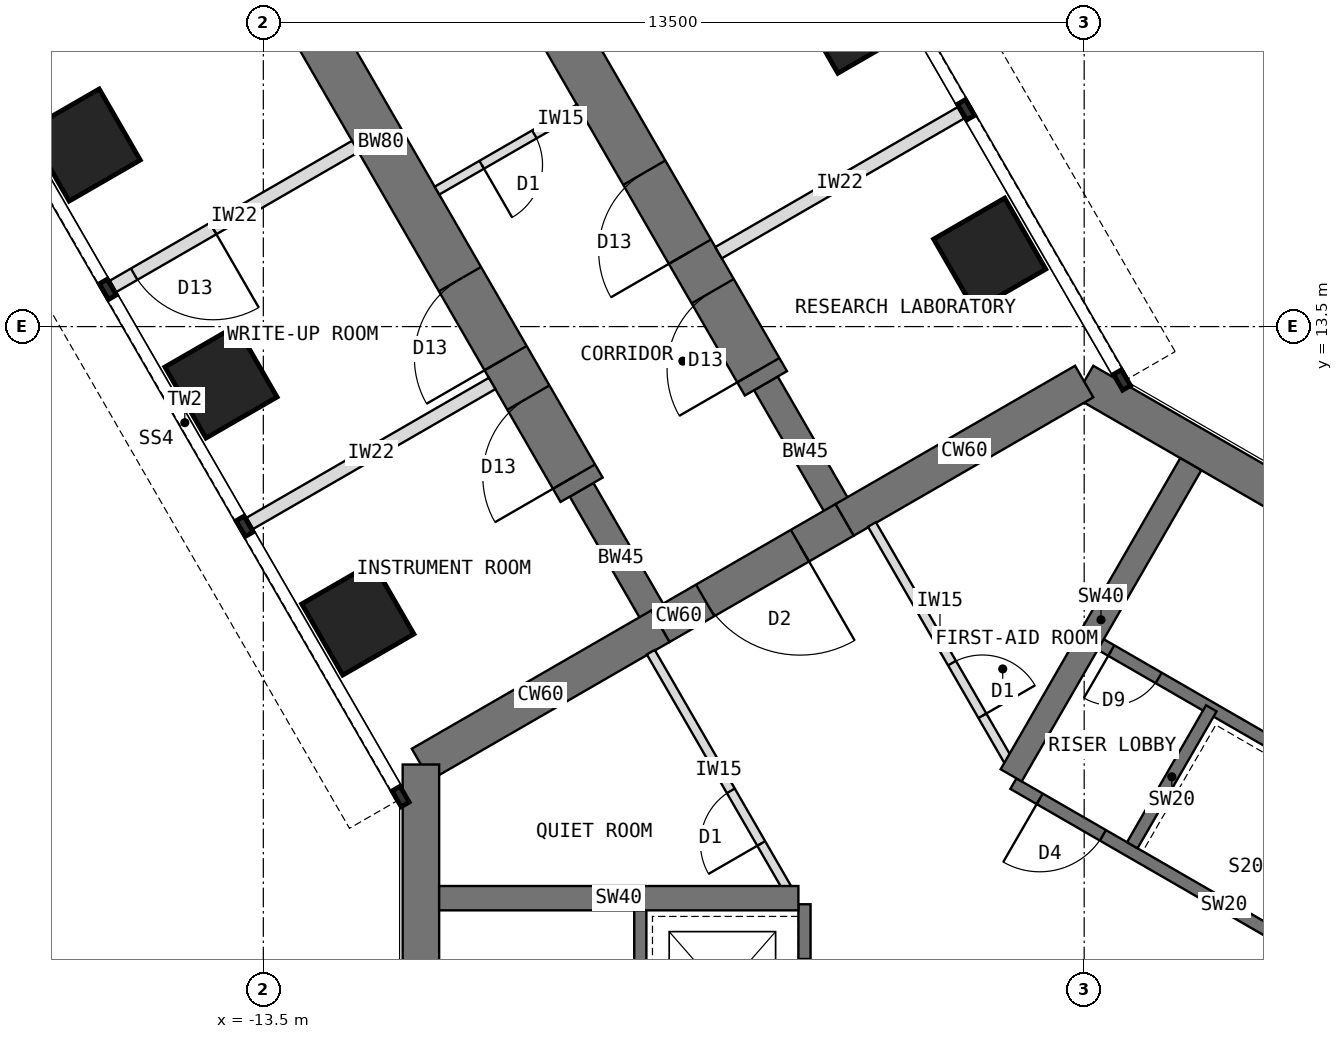
"""IFC4 building model, lengths in metres.
Left out: names, types, materials, properties, quantities, classifications, styles, units other than length and angle.
Written with IfcOpenShell. Run it as: python <this file> out.ifc"""

import sys

from ifc_helpers import new_model, si_unit, direction, frame, frame_2d, origin, origin_2d, place, context, subcontext, project, spatial, rectangle, extrude, element, fill, save


model = new_model("IFC4")
c1 = context("Model", 3, precision=1e-05, world=origin(), true_north=direction((0.0, 1.0)))
c2 = subcontext(c1, "Body", "Model", "MODEL_VIEW")
j1 = project(units=[si_unit("LENGTHUNIT", "METRE"), si_unit("PLANEANGLEUNIT", "RADIAN")], contexts=[c1])
p1 = place(None, origin())
s1 = spatial("IfcSite", under=j1, at=p1, CompositionType="ELEMENT")
p2 = place(p1, origin())
s2 = spatial("IfcBuilding", under=s1, at=p2, CompositionType="ELEMENT")
p3 = place(p2, frame((0.0, 0.0, 113.5)))
s3 = spatial("IfcBuildingStorey", under=s2, at=p3, CompositionType="ELEMENT", Elevation=113.5)
p4 = place(p3, frame((10.908, 6.298, 0.0), z_axis=(0.0, 0.0, 1.0), x_axis=(-0.866021940709, 0.500005998175, 0.0)))
e1 = element("IfcWall", 1, at=p4, inside=s3, PredefinedType="SHEAR", context=c2, shape_type="SweptSolid", body=[
    extrude(rectangle(XDim=12.596, YDim=0.6, at=frame_2d((6.298, 0.0))), origin(), (0.0, 0.0, 1.0), 4.0),
])
p5 = place(p3, frame((0.0, 12.596, 0.0), z_axis=(0.0, 0.0, 1.0), x_axis=(-0.866011268655, -0.500024481964, 0.0)))
e2 = element("IfcWall", 2, at=p5, inside=s3, PredefinedType="SHEAR", context=c2, shape_type="SweptSolid", body=[
    extrude(rectangle(XDim=4.548, YDim=0.6, at=frame_2d((2.274, 0.0))), origin(), (0.0, 0.0, 1.0), 4.0),
])
p6 = place(p3, frame((-3.939, 10.322, 0.0), z_axis=(0.0, 0.0, 1.0), x_axis=(-0.866019471182, -0.500010275428, 0.0)))
e3 = element("IfcWall", 3, at=p6, inside=s3, PredefinedType="SHEAR", context=c2, shape_type="SweptSolid", body=[
    extrude(rectangle(XDim=3.5, YDim=0.6, at=frame_2d((1.75, 0.0))), origin(), (0.0, 0.0, 1.0), 4.0),
])
p7 = place(p6, frame((0.85, 0.0, 0.0)))
e4 = element("IfcOpeningElement", 4, at=p7, cuts=e3, PredefinedType="OPENING", context=c2, shape_type="SweptSolid", body=[
    extrude(rectangle(XDim=1.8, YDim=2.1, at=frame_2d((0.9, 1.05))), frame((0.0, 0.31, 0.0), z_axis=(0.0, -1.0, 0.0), x_axis=(1.0, 0.0, 0.0)), (0.0, 0.0, 1.0), 0.62),
])
p8 = place(p3, frame((-6.97, 8.572, 0.0), z_axis=(0.0, 0.0, 1.0), x_axis=(-0.866034513004, -0.499984222037, 0.0)))
e5 = element("IfcWall", 5, at=p8, inside=s3, PredefinedType="SHEAR", context=c2, shape_type="SweptSolid", body=[
    extrude(rectangle(XDim=4.548, YDim=0.6, at=frame_2d((2.274, 0.0))), origin(), (0.0, 0.0, 1.0), 4.0),
])
p9 = place(p3, frame((-10.908, 6.298, 0.0), z_axis=(0.0, 0.0, 1.0), x_axis=(0.0, -1.0, 0.0)))
e6 = element("IfcWall", 6, at=p9, inside=s3, PredefinedType="SHEAR", context=c2, shape_type="SweptSolid", body=[
    extrude(rectangle(XDim=12.596, YDim=0.6, at=frame_2d((6.298, 0.0))), origin(), (0.0, 0.0, 1.0), 4.0),
])
p10 = place(p3, frame((-6.97, 8.572, 0.0), z_axis=(0.0, 0.0, 1.0), x_axis=(-0.499988811324, 0.866031863473, 0.0)))
e7 = element("IfcWall", 7, at=p10, inside=s3, PredefinedType="SHEAR", context=c2, shape_type="SweptSolid", body=[
    extrude(rectangle(XDim=2.592, YDim=0.45, at=frame_2d((1.296, 0.0))), origin(), (0.0, 0.0, 1.0), 4.0),
])
p11 = place(p3, frame((-8.266, 10.816, 0.0), z_axis=(0.0, 0.0, 1.0), x_axis=(-0.499996231654, 0.866027579429, 0.0)))
e8 = element("IfcWall", 8, at=p11, inside=s3, PredefinedType="SHEAR", context=c2, shape_type="SweptSolid", body=[
    extrude(rectangle(XDim=13.2, YDim=0.8, at=frame_2d((6.6, 0.0))), origin(), (0.0, 0.0, 1.0), 4.0),
])
p12 = place(p11, frame((0.25, 0.0, 0.0)))
e9 = element("IfcOpeningElement", 9, at=p12, cuts=e8, PredefinedType="OPENING", context=c2, shape_type="SweptSolid", body=[
    extrude(rectangle(XDim=1.5, YDim=2.1, at=frame_2d((0.75, 1.05))), frame((0.0, 0.41, 0.0), z_axis=(0.0, -1.0, 0.0), x_axis=(1.0, 0.0, 0.0)), (0.0, 0.0, 1.0), 0.82),
])
p13 = place(p11, frame((2.5, 0.0, 0.0)))
e10 = element("IfcOpeningElement", 10, at=p13, cuts=e8, PredefinedType="OPENING", context=c2, shape_type="SweptSolid", body=[
    extrude(rectangle(XDim=1.5, YDim=2.1, at=frame_2d((0.75, 1.05))), frame((0.0, 0.41, 0.0), z_axis=(0.0, -1.0, 0.0), x_axis=(1.0, 0.0, 0.0)), (0.0, 0.0, 1.0), 0.82),
])
p14 = place(p3, frame((-3.939, 10.322, 0.0), z_axis=(0.0, 0.0, 1.0), x_axis=(-0.499918158782, 0.866072649678, 0.0)))
e11 = element("IfcWall", 11, at=p14, inside=s3, PredefinedType="SHEAR", context=c2, shape_type="SweptSolid", body=[
    extrude(rectangle(XDim=2.592, YDim=0.45, at=frame_2d((1.296, 0.0))), origin(), (0.0, 0.0, 1.0), 4.0),
])
p15 = place(p3, frame((-5.234, 12.566, 0.0), z_axis=(0.0, 0.0, 1.0), x_axis=(-0.500010103361, 0.866019570528, 0.0)))
e12 = element("IfcWall", 12, at=p15, inside=s3, PredefinedType="SHEAR", context=c2, shape_type="SweptSolid", body=[
    extrude(rectangle(XDim=13.2, YDim=0.8, at=frame_2d((6.6, 0.0))), origin(), (0.0, 0.0, 1.0), 4.0),
])
p16 = place(p15, frame((0.25, 0.0, 0.0)))
e13 = element("IfcOpeningElement", 13, at=p16, cuts=e12, PredefinedType="OPENING", context=c2, shape_type="SweptSolid", body=[
    extrude(rectangle(XDim=1.5, YDim=2.1, at=frame_2d((0.75, 1.05))), frame((0.0, 0.41, 0.0), z_axis=(0.0, -1.0, 0.0), x_axis=(1.0, 0.0, 0.0)), (0.0, 0.0, 1.0), 0.82),
])
p17 = place(p15, frame((2.5, 0.0, 0.0)))
e14 = element("IfcOpeningElement", 14, at=p17, cuts=e12, PredefinedType="OPENING", context=c2, shape_type="SweptSolid", body=[
    extrude(rectangle(XDim=1.5, YDim=2.1, at=frame_2d((0.75, 1.05))), frame((0.0, 0.41, 0.0), z_axis=(0.0, -1.0, 0.0), x_axis=(1.0, 0.0, 0.0)), (0.0, 0.0, 1.0), 0.82),
])
for number, where, z_axis, x_axis in (
    (15, (-11.946, 8.691, 0.0), (0.0, 0.0, 1.0), (0.866, 0.5, 0.0)),
    (16, (-1.554, 14.691, 0.0), (0.0, 0.0, 1.0), (0.866, 0.5, 0.0)),
    (17, (-14.196, 12.588, 0.0), (0.0, 0.0, 1.0), (0.866, 0.5, 0.0)),
    (18, (-3.804, 18.588, 0.0), (0.0, 0.0, 1.0), (0.866, 0.5, 0.0)),
    (19, (-16.446, 16.486, 0.0), (0.0, 0.0, 1.0), (0.866, 0.5, 0.0)),
):
    element("IfcColumn", number, at=place(p3, frame(where, z_axis=z_axis, x_axis=x_axis)), inside=s3, PredefinedType="COLUMN", context=c2, shape_type="SweptSolid", body=[
        extrude(rectangle(XDim=1.35, YDim=1.35, at=origin_2d()), origin(), (0.0, 0.0, 1.0), 4.0),
    ])
p18 = place(p3, frame((-18.456, 18.067, 0.0), z_axis=(0.0, 0.0, 1.0), x_axis=(0.865998469481, 0.500046648681, 0.0)))
e20 = element("IfcWall", 20, at=p18, inside=s3, PredefinedType="STANDARD", context=c2, shape_type="SweptSolid", body=[
    extrude(rectangle(XDim=2.325, YDim=0.25, at=frame_2d((1.163, 0.0))), origin(), (0.0, 0.0, 1.0), 3.8),
])
p19 = place(p3, frame((5.764, 1.984, 0.0), z_axis=(0.0, 0.0, 1.0), x_axis=(-0.866026010844, 0.49999894854, 0.0)))
e21 = element("IfcWall", 21, at=p19, inside=s3, PredefinedType="SHEAR", context=c2, shape_type="SweptSolid", body=[
    extrude(rectangle(XDim=8.0, YDim=0.2, at=frame_2d((4.0, 0.0))), origin(), (0.0, 0.0, 1.0), 4.0),
])
p20 = place(p19, frame((6.3, 0.0, 0.0)))
e22 = element("IfcOpeningElement", 22, at=p20, cuts=e21, PredefinedType="OPENING", context=c2, shape_type="SweptSolid", body=[
    extrude(rectangle(XDim=1.2, YDim=2.1, at=frame_2d((0.6, 1.05))), frame((0.0, 0.11, 0.0), z_axis=(0.0, -1.0, 0.0), x_axis=(1.0, 0.0, 0.0)), (0.0, 0.0, 1.0), 0.22),
])
p21 = place(p3, frame((0.791, 4.97, 0.0), z_axis=(0.0, 0.0, 1.0), x_axis=(0.499936506574, 0.866062058628, 0.0)))
e23 = element("IfcWall", 23, at=p21, inside=s3, PredefinedType="SHEAR", context=c2, shape_type="SweptSolid", body=[
    extrude(rectangle(XDim=2.6, YDim=0.2, at=frame_2d((1.3, 0.0))), origin(), (0.0, 0.0, 1.0), 4.0),
])
p22 = place(p3, frame((7.114, 4.322, 0.0), z_axis=(0.0, 0.0, 1.0), x_axis=(-0.866026010844, 0.49999894854, 0.0)))
e24 = element("IfcWall", 24, at=p22, inside=s3, PredefinedType="SHEAR", context=c2, shape_type="SweptSolid", body=[
    extrude(rectangle(XDim=8.0, YDim=0.2, at=frame_2d((4.0, 0.0))), origin(), (0.0, 0.0, 1.0), 4.0),
])
p23 = place(p22, frame((6.8, 0.0, 0.0)))
e25 = element("IfcOpeningElement", 25, at=p23, cuts=e24, PredefinedType="OPENING", context=c2, shape_type="SweptSolid", body=[
    extrude(rectangle(XDim=0.9, YDim=2.1, at=frame_2d((0.45, 1.05))), frame((0.0, 0.11, 0.0), z_axis=(0.0, -1.0, 0.0), x_axis=(1.0, 0.0, 0.0)), (0.0, 0.0, 1.0), 0.22),
])
p24 = place(p3, frame((-1.201, 6.12, 0.0), z_axis=(0.0, 0.0, 1.0), x_axis=(0.49999668571, 0.866027317282, 0.0)))
e26 = element("IfcWall", 26, at=p24, inside=s3, PredefinedType="SHEAR", context=c2, shape_type="SweptSolid", body=[
    extrude(rectangle(XDim=5.908, YDim=0.4, at=frame_2d((2.954, 0.0))), origin(), (0.0, 0.0, 1.0), 4.0),
])
p25 = place(p3, frame((-4.6, 4.0, 0.0), z_axis=(0.0, 0.0, 1.0), x_axis=(0.0, -1.0, 0.0)))
e27 = element("IfcWall", 27, at=p25, inside=s3, PredefinedType="SHEAR", context=c2, shape_type="SweptSolid", body=[
    extrude(rectangle(XDim=8.0, YDim=0.2, at=frame_2d((4.0, 0.0))), origin(), (0.0, 0.0, 1.0), 4.0),
])
p26 = place(p25, frame((6.3, 0.0, 0.0)))
e28 = element("IfcOpeningElement", 28, at=p26, cuts=e27, PredefinedType="OPENING", context=c2, shape_type="SweptSolid", body=[
    extrude(rectangle(XDim=1.2, YDim=2.1, at=frame_2d((0.6, 1.05))), frame((0.0, 0.11, 0.0), z_axis=(0.0, -1.0, 0.0), x_axis=(1.0, 0.0, 0.0)), (0.0, 0.0, 1.0), 0.22),
])
p27 = place(p25, frame((0.9, 0.0, 0.0)))
e29 = element("IfcOpeningElement", 29, at=p27, cuts=e27, PredefinedType="OPENING", context=c2, shape_type="SweptSolid", body=[
    extrude(rectangle(XDim=1.1, YDim=2.2, at=frame_2d((0.55, 1.1))), frame((0.0, 0.11, 0.0), z_axis=(0.0, -1.0, 0.0), x_axis=(1.0, 0.0, 0.0)), (0.0, 0.0, 1.0), 0.22),
])
p28 = place(p3, frame((-7.3, 4.0, 0.0), z_axis=(0.0, 0.0, 1.0), x_axis=(0.0, -1.0, 0.0)))
e30 = element("IfcWall", 30, at=p28, inside=s3, PredefinedType="SHEAR", context=c2, shape_type="SweptSolid", body=[
    extrude(rectangle(XDim=8.0, YDim=0.2, at=frame_2d((4.0, 0.0))), origin(), (0.0, 0.0, 1.0), 4.0),
])
p29 = place(p28, frame((6.7, 0.0, 0.0)))
e31 = element("IfcOpeningElement", 31, at=p29, cuts=e30, PredefinedType="OPENING", context=c2, shape_type="SweptSolid", body=[
    extrude(rectangle(XDim=1.1, YDim=2.1, at=frame_2d((0.55, 1.05))), frame((0.0, 0.11, 0.0), z_axis=(0.0, -1.0, 0.0), x_axis=(1.0, 0.0, 0.0)), (0.0, 0.0, 1.0), 0.22),
])
p30 = place(p3, frame((-4.7, 4.1, 0.0), z_axis=(0.0, 0.0, 1.0), x_axis=(-1.0, 0.0, 0.0)))
e32 = element("IfcWall", 32, at=p30, inside=s3, PredefinedType="SHEAR", context=c2, shape_type="SweptSolid", body=[
    extrude(rectangle(XDim=5.908, YDim=0.4, at=frame_2d((2.954, 0.0))), origin(), (0.0, 0.0, 1.0), 4.0),
])
p31 = place(p3, frame((-9.737, 12.565, 0.0), z_axis=(0.0, 0.0, 1.0), x_axis=(-0.866016770315, -0.500014953309, 0.0)))
e33 = element("IfcWall", 33, at=p31, inside=s3, PredefinedType="PARTITIONING", context=c2, shape_type="SweptSolid", body=[
    extrude(rectangle(XDim=4.6, YDim=0.215, at=frame_2d((2.3, 0.0))), origin(), (0.0, 0.0, 1.0), 3.8),
])
p32 = place(p3, frame((-11.987, 16.462, 0.0), z_axis=(0.0, 0.0, 1.0), x_axis=(-0.866039752405, -0.499975146636, 0.0)))
e34 = element("IfcWall", 34, at=p32, inside=s3, PredefinedType="PARTITIONING", context=c2, shape_type="SweptSolid", body=[
    extrude(rectangle(XDim=4.6, YDim=0.215, at=frame_2d((2.3, 0.0))), origin(), (0.0, 0.0, 1.0), 3.8),
])
p33 = place(p32, frame((2.7, 0.0, 0.0)))
e35 = element("IfcOpeningElement", 35, at=p33, cuts=e34, PredefinedType="OPENING", context=c2, shape_type="SweptSolid", body=[
    extrude(rectangle(XDim=1.5, YDim=2.1, at=frame_2d((0.75, 1.05))), frame((0.0, 0.117, 0.0), z_axis=(0.0, -1.0, 0.0), x_axis=(1.0, 0.0, 0.0)), (0.0, 0.0, 1.0), 0.235),
])
p34 = place(p3, frame((-6.013, 14.715, 0.0), z_axis=(0.0, 0.0, 1.0), x_axis=(0.866016770315, 0.500014953309, 0.0)))
e36 = element("IfcWall", 36, at=p34, inside=s3, PredefinedType="PARTITIONING", context=c2, shape_type="SweptSolid", body=[
    extrude(rectangle(XDim=4.6, YDim=0.215, at=frame_2d((2.3, 0.0))), origin(), (0.0, 0.0, 1.0), 3.8),
])
p35 = place(p3, frame((-4.89, 4.27, 0.0), z_axis=(0.0, 0.0, 1.0), x_axis=(-0.499999473313, 0.866025707867, 0.0)))
e37 = element("IfcWall", 37, at=p35, inside=s3, PredefinedType="PARTITIONING", context=c2, shape_type="SweptSolid", body=[
    extrude(rectangle(XDim=4.476, YDim=0.15, at=frame_2d((2.238, 0.0))), origin(), (0.0, 0.0, 1.0), 3.8),
])
p36 = place(p35, frame((0.843, 0.0, 0.0)))
e38 = element("IfcOpeningElement", 38, at=p36, cuts=e37, PredefinedType="OPENING", context=c2, shape_type="SweptSolid", body=[
    extrude(rectangle(XDim=1.0, YDim=2.1, at=frame_2d((0.5, 1.05))), frame((0.0, 0.085, 0.0), z_axis=(0.0, -1.0, 0.0), x_axis=(1.0, 0.0, 0.0)), (0.0, 0.0, 1.0), 0.17),
])
p37 = place(p3, frame((-3.49, 10.246, 0.0), z_axis=(0.0, 0.0, 1.0), x_axis=(0.499999473313, -0.866025707867, 0.0)))
e39 = element("IfcWall", 39, at=p37, inside=s3, PredefinedType="PARTITIONING", context=c2, shape_type="SweptSolid", body=[
    extrude(rectangle(XDim=4.476, YDim=0.15, at=frame_2d((2.238, 0.0))), origin(), (0.0, 0.0, 1.0), 3.8),
])
p38 = place(p37, frame((2.633, 0.0, 0.0)))
e40 = element("IfcOpeningElement", 40, at=p38, cuts=e39, PredefinedType="OPENING", context=c2, shape_type="SweptSolid", body=[
    extrude(rectangle(XDim=1.0, YDim=2.1, at=frame_2d((0.5, 1.05))), frame((0.0, 0.085, 0.0), z_axis=(0.0, -1.0, 0.0), x_axis=(1.0, 0.0, 0.0)), (0.0, 0.0, 1.0), 0.17),
])
p39 = place(p3, frame((-8.306, 17.086, 0.0), z_axis=(0.0, 0.0, 1.0), x_axis=(-0.86599734893, -0.500048589285, 0.0)))
e41 = element("IfcWall", 41, at=p39, inside=s3, PredefinedType="PARTITIONING", context=c2, shape_type="SweptSolid", body=[
    extrude(rectangle(XDim=2.7, YDim=0.15, at=frame_2d((1.35, 0.0))), origin(), (0.0, 0.0, 1.0), 3.8),
])
p40 = place(p39, frame((0.85, 0.0, 0.0)))
e42 = element("IfcOpeningElement", 42, at=p40, cuts=e41, PredefinedType="OPENING", context=c2, shape_type="SweptSolid", body=[
    extrude(rectangle(XDim=1.0, YDim=2.1, at=frame_2d((0.5, 1.05))), frame((0.0, 0.085, 0.0), z_axis=(0.0, -1.0, 0.0), x_axis=(1.0, 0.0, 0.0)), (0.0, 0.0, 1.0), 0.17),
])
p41 = place(p20, origin())
e43 = element("IfcDoor", 43, at=p41, inside=s3, OperationType="SINGLE_SWING_RIGHT", PredefinedType="DOOR", context=c2, shape_type="SweptSolid", body=[
    extrude(rectangle(XDim=1.2, YDim=2.1, at=frame_2d((0.6, 1.05))), frame((0.0, 0.025, 0.0), z_axis=(0.0, -1.0, 0.0), x_axis=(1.0, 0.0, 0.0)), (0.0, 0.0, 1.0), 0.05),
])
fill(e22, e43)
p42 = place(p23, origin())
e44 = element("IfcDoor", 44, at=p42, inside=s3, OperationType="SINGLE_SWING_RIGHT", PredefinedType="DOOR", context=c2, shape_type="SweptSolid", body=[
    extrude(rectangle(XDim=0.9, YDim=2.1, at=frame_2d((0.45, 1.05))), frame((0.0, 0.025, 0.0), z_axis=(0.0, -1.0, 0.0), x_axis=(1.0, 0.0, 0.0)), (0.0, 0.0, 1.0), 0.05),
])
fill(e25, e44)
p43 = place(p7, origin())
e45 = element("IfcDoor", 45, at=p43, inside=s3, OperationType="DOUBLE_DOOR_DOUBLE_SWING", PredefinedType="DOOR", context=c2, shape_type="SweptSolid", body=[
    extrude(rectangle(XDim=1.72, YDim=2.06, at=frame_2d((0.9, 1.03))), frame((0.0, 0.025, 0.0), z_axis=(0.0, -1.0, 0.0), x_axis=(1.0, 0.0, 0.0)), (0.0, 0.0, 1.0), 0.05),
    extrude(rectangle(XDim=0.04, YDim=2.1, at=frame_2d((0.02, 1.05))), frame((0.0, 0.3, 0.0), z_axis=(0.0, -1.0, 0.0), x_axis=(1.0, 0.0, 0.0)), (0.0, 0.0, 1.0), 0.6),
    extrude(rectangle(XDim=0.04, YDim=2.1, at=frame_2d((1.78, 1.05))), frame((0.0, 0.3, 0.0), z_axis=(0.0, -1.0, 0.0), x_axis=(1.0, 0.0, 0.0)), (0.0, 0.0, 1.0), 0.6),
    extrude(rectangle(XDim=1.72, YDim=0.04, at=frame_2d((0.9, 2.08))), frame((0.0, 0.3, 0.0), z_axis=(0.0, -1.0, 0.0), x_axis=(1.0, 0.0, 0.0)), (0.0, 0.0, 1.0), 0.6),
])
fill(e4, e45)
p44 = place(p33, origin())
e46 = element("IfcDoor", 46, at=p44, inside=s3, OperationType="DOUBLE_DOOR_SINGLE_SWING", PredefinedType="DOOR", context=c2, shape_type="SweptSolid", body=[
    extrude(rectangle(XDim=1.5, YDim=2.1, at=frame_2d((0.75, 1.05))), frame((0.0, 0.025, 0.0), z_axis=(0.0, -1.0, 0.0), x_axis=(1.0, 0.0, 0.0)), (0.0, 0.0, 1.0), 0.05),
])
fill(e35, e46)
p45 = place(p38, origin())
e47 = element("IfcDoor", 47, at=p45, inside=s3, OperationType="SINGLE_SWING_RIGHT", PredefinedType="DOOR", context=c2, shape_type="SweptSolid", body=[
    extrude(rectangle(XDim=1.0, YDim=2.1, at=frame_2d((0.5, 1.05))), frame((0.0, 0.025, 0.0), z_axis=(0.0, -1.0, 0.0), x_axis=(1.0, 0.0, 0.0)), (0.0, 0.0, 1.0), 0.05),
])
fill(e40, e47)
p46 = place(p36, origin())
e48 = element("IfcDoor", 48, at=p46, inside=s3, OperationType="SINGLE_SWING_LEFT", PredefinedType="DOOR", context=c2, shape_type="SweptSolid", body=[
    extrude(rectangle(XDim=1.0, YDim=2.1, at=frame_2d((0.5, 1.05))), frame((0.0, 0.025, 0.0), z_axis=(0.0, -1.0, 0.0), x_axis=(1.0, 0.0, 0.0)), (0.0, 0.0, 1.0), 0.05),
])
fill(e38, e48)
p47 = place(p40, origin())
e49 = element("IfcDoor", 49, at=p47, inside=s3, OperationType="SINGLE_SWING_RIGHT", PredefinedType="DOOR", context=c2, shape_type="SweptSolid", body=[
    extrude(rectangle(XDim=1.0, YDim=2.1, at=frame_2d((0.5, 1.05))), frame((0.0, 0.025, 0.0), z_axis=(0.0, -1.0, 0.0), x_axis=(1.0, 0.0, 0.0)), (0.0, 0.0, 1.0), 0.05),
])
fill(e42, e49)
p48 = place(p12, origin())
e50 = element("IfcDoor", 50, at=p48, inside=s3, OperationType="DOUBLE_DOOR_SINGLE_SWING", PredefinedType="DOOR", context=c2, shape_type="SweptSolid", body=[
    extrude(rectangle(XDim=1.42, YDim=2.06, at=frame_2d((0.75, 1.03))), frame((0.0, 0.025, 0.0), z_axis=(0.0, -1.0, 0.0), x_axis=(1.0, 0.0, 0.0)), (0.0, 0.0, 1.0), 0.05),
    extrude(rectangle(XDim=0.04, YDim=2.1, at=frame_2d((0.02, 1.05))), frame((0.0, 0.4, 0.0), z_axis=(0.0, -1.0, 0.0), x_axis=(1.0, 0.0, 0.0)), (0.0, 0.0, 1.0), 0.8),
    extrude(rectangle(XDim=0.04, YDim=2.1, at=frame_2d((1.48, 1.05))), frame((0.0, 0.4, 0.0), z_axis=(0.0, -1.0, 0.0), x_axis=(1.0, 0.0, 0.0)), (0.0, 0.0, 1.0), 0.8),
    extrude(rectangle(XDim=1.42, YDim=0.04, at=frame_2d((0.75, 2.08))), frame((0.0, 0.4, 0.0), z_axis=(0.0, -1.0, 0.0), x_axis=(1.0, 0.0, 0.0)), (0.0, 0.0, 1.0), 0.8),
])
fill(e9, e50)
p49 = place(p13, origin())
e51 = element("IfcDoor", 51, at=p49, inside=s3, OperationType="DOUBLE_DOOR_SINGLE_SWING", PredefinedType="DOOR", context=c2, shape_type="SweptSolid", body=[
    extrude(rectangle(XDim=1.42, YDim=2.06, at=frame_2d((0.75, 1.03))), frame((0.0, 0.025, 0.0), z_axis=(0.0, -1.0, 0.0), x_axis=(1.0, 0.0, 0.0)), (0.0, 0.0, 1.0), 0.05),
    extrude(rectangle(XDim=0.04, YDim=2.1, at=frame_2d((0.02, 1.05))), frame((0.0, 0.4, 0.0), z_axis=(0.0, -1.0, 0.0), x_axis=(1.0, 0.0, 0.0)), (0.0, 0.0, 1.0), 0.8),
    extrude(rectangle(XDim=0.04, YDim=2.1, at=frame_2d((1.48, 1.05))), frame((0.0, 0.4, 0.0), z_axis=(0.0, -1.0, 0.0), x_axis=(1.0, 0.0, 0.0)), (0.0, 0.0, 1.0), 0.8),
    extrude(rectangle(XDim=1.42, YDim=0.04, at=frame_2d((0.75, 2.08))), frame((0.0, 0.4, 0.0), z_axis=(0.0, -1.0, 0.0), x_axis=(1.0, 0.0, 0.0)), (0.0, 0.0, 1.0), 0.8),
])
fill(e10, e51)
p50 = place(p16, origin())
e52 = element("IfcDoor", 52, at=p50, inside=s3, OperationType="DOUBLE_DOOR_SINGLE_SWING", PredefinedType="DOOR", context=c2, shape_type="SweptSolid", body=[
    extrude(rectangle(XDim=1.42, YDim=2.06, at=frame_2d((0.75, 1.03))), frame((0.0, 0.025, 0.0), z_axis=(0.0, -1.0, 0.0), x_axis=(1.0, 0.0, 0.0)), (0.0, 0.0, 1.0), 0.05),
    extrude(rectangle(XDim=0.04, YDim=2.1, at=frame_2d((0.02, 1.05))), frame((0.0, 0.4, 0.0), z_axis=(0.0, -1.0, 0.0), x_axis=(1.0, 0.0, 0.0)), (0.0, 0.0, 1.0), 0.8),
    extrude(rectangle(XDim=0.04, YDim=2.1, at=frame_2d((1.48, 1.05))), frame((0.0, 0.4, 0.0), z_axis=(0.0, -1.0, 0.0), x_axis=(1.0, 0.0, 0.0)), (0.0, 0.0, 1.0), 0.8),
    extrude(rectangle(XDim=1.42, YDim=0.04, at=frame_2d((0.75, 2.08))), frame((0.0, 0.4, 0.0), z_axis=(0.0, -1.0, 0.0), x_axis=(1.0, 0.0, 0.0)), (0.0, 0.0, 1.0), 0.8),
])
fill(e13, e52)
p51 = place(p17, origin())
e53 = element("IfcDoor", 53, at=p51, inside=s3, OperationType="DOUBLE_DOOR_SINGLE_SWING", PredefinedType="DOOR", context=c2, shape_type="SweptSolid", body=[
    extrude(rectangle(XDim=1.42, YDim=2.06, at=frame_2d((0.75, 1.03))), frame((0.0, 0.025, 0.0), z_axis=(0.0, -1.0, 0.0), x_axis=(1.0, 0.0, 0.0)), (0.0, 0.0, 1.0), 0.05),
    extrude(rectangle(XDim=0.04, YDim=2.1, at=frame_2d((0.02, 1.05))), frame((0.0, 0.4, 0.0), z_axis=(0.0, -1.0, 0.0), x_axis=(1.0, 0.0, 0.0)), (0.0, 0.0, 1.0), 0.8),
    extrude(rectangle(XDim=0.04, YDim=2.1, at=frame_2d((1.48, 1.05))), frame((0.0, 0.4, 0.0), z_axis=(0.0, -1.0, 0.0), x_axis=(1.0, 0.0, 0.0)), (0.0, 0.0, 1.0), 0.8),
    extrude(rectangle(XDim=1.42, YDim=0.04, at=frame_2d((0.75, 2.08))), frame((0.0, 0.4, 0.0), z_axis=(0.0, -1.0, 0.0), x_axis=(1.0, 0.0, 0.0)), (0.0, 0.0, 1.0), 0.8),
])
fill(e14, e53)
save(model, sys.argv[1])
